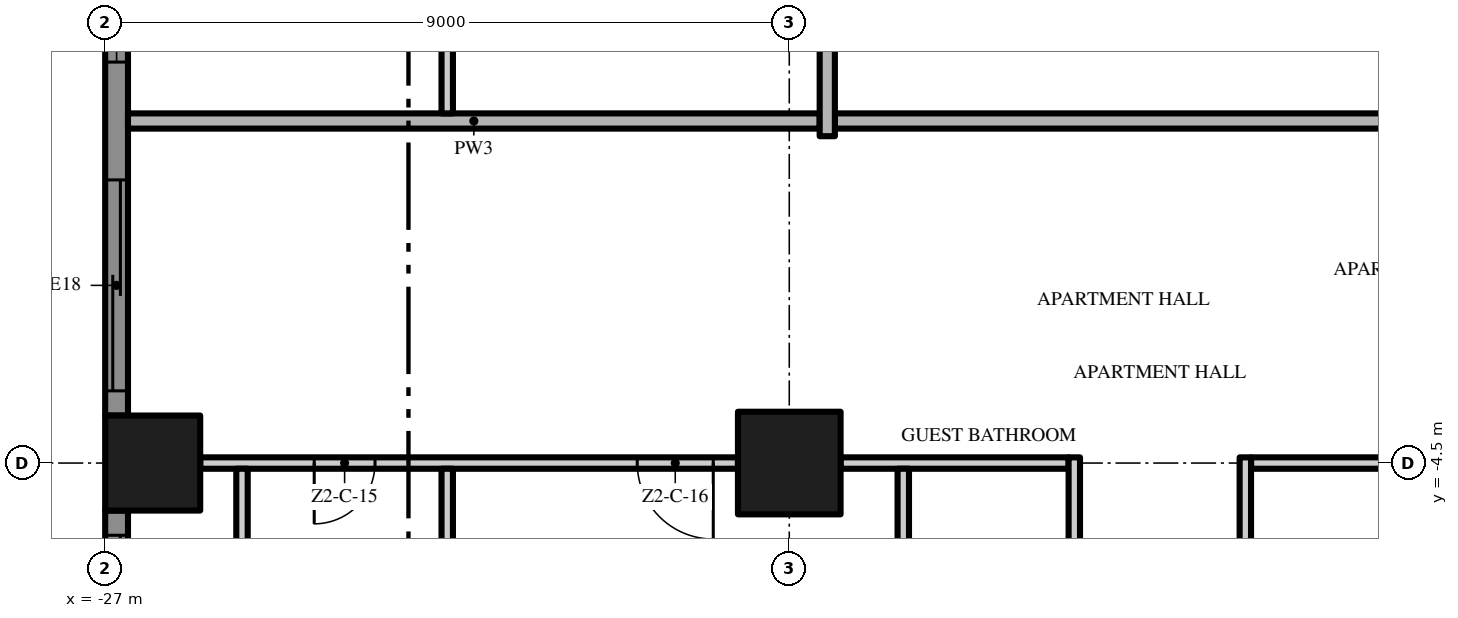
"""IFC4 building model, lengths in metres.
Left out: names, types, materials, properties, quantities, classifications, styles, units other than length and angle.
Written with IfcOpenShell. Run it as: python <this file> out.ifc"""

import sys

from ifc_helpers import new_model, si_unit, direction, frame, frame_2d, origin, origin_2d, place, context, subcontext, project, spatial, polyline, rectangle, outline, extrude, element, fill, save


model = new_model("IFC4")
c1 = context("Model", 3, precision=1e-05, world=origin(), true_north=direction((0.0, 1.0)))
c2 = subcontext(c1, "Body", "Model", "MODEL_VIEW")
j1 = project(units=[si_unit("LENGTHUNIT", "METRE"), si_unit("PLANEANGLEUNIT", "RADIAN")], contexts=[c1])
p1 = place(None, origin())
s1 = spatial("IfcSite", under=j1, at=p1, CompositionType="ELEMENT")
p2 = place(p1, origin())
s2 = spatial("IfcBuilding", under=s1, at=p2, CompositionType="ELEMENT")
p3 = place(p2, frame((0.0, 0.0, 99.8)))
s3 = spatial("IfcBuildingStorey", under=s2, at=p3, CompositionType="ELEMENT", Elevation=99.8)
p4 = place(p3, frame((-18.0, -4.5, 0.0), z_axis=(0.0, 0.0, 1.0), x_axis=(1.0, 0.0, 0.0)))
e1 = element("IfcColumn", 1, at=p4, inside=s3, PredefinedType="COLUMN", context=c2, shape_type="SweptSolid", body=[
    extrude(rectangle(XDim=1.35, YDim=1.35, at=origin_2d()), origin(), (0.0, 0.0, 1.0), 3.5),
])
p5 = place(p3, frame((-26.375, -4.5, 0.0), z_axis=(0.0, 0.0, 1.0), x_axis=(1.0, 0.0, 0.0)))
e2 = element("IfcColumn", 2, at=p5, inside=s3, PredefinedType="COLUMN", context=c2, shape_type="SweptSolid", body=[
    extrude(rectangle(XDim=1.25, YDim=1.25, at=origin_2d()), origin(), (0.0, 0.0, 1.0), 3.5),
])
p6 = place(p3, frame((-26.85, -3.875, 0.0), z_axis=(0.0, 0.0, 1.0), x_axis=(0.0, 1.0, 0.0)))
e3 = element("IfcWall", 3, at=p6, inside=s3, PredefinedType="SOLIDWALL", context=c2, shape_type="SweptSolid", body=[
    extrude(rectangle(XDim=7.75, YDim=0.3, at=frame_2d((3.875, 0.0))), origin(), (0.0, 0.0, 1.0), 3.5),
])
p7 = place(p6, frame((4.65, 0.0, 0.45)))
e4 = element("IfcOpeningElement", 4, at=p7, cuts=e3, PredefinedType="OPENING", context=c2, shape_type="SweptSolid", body=[
    extrude(rectangle(XDim=2.775, YDim=2.65, at=frame_2d((1.387, 1.325))), frame((0.0, 0.16, 0.0), z_axis=(0.0, -1.0, 0.0), x_axis=(1.0, 0.0, 0.0)), (0.0, 0.0, 1.0), 0.32),
])
p8 = place(p6, frame((0.325, 0.0, 0.0)))
e5 = element("IfcOpeningElement", 5, at=p8, cuts=e3, PredefinedType="OPENING", context=c2, shape_type="SweptSolid", body=[
    extrude(rectangle(XDim=2.775, YDim=2.4, at=frame_2d((1.387, 1.2))), frame((0.0, 0.16, 0.0), z_axis=(0.0, -1.0, 0.0), x_axis=(1.0, 0.0, 0.0)), (0.0, 0.0, 1.0), 0.32),
])
p9 = place(p3, frame((-26.85, -12.875, 0.0), z_axis=(0.0, 0.0, 1.0), x_axis=(0.0, 1.0, 0.0)))
e6 = element("IfcWall", 6, at=p9, inside=s3, PredefinedType="SOLIDWALL", context=c2, shape_type="SweptSolid", body=[
    extrude(rectangle(XDim=7.75, YDim=0.3, at=frame_2d((3.875, 0.0))), origin(), (0.0, 0.0, 1.0), 3.5),
])
p10 = place(p9, frame((4.65, 0.0, 0.0)))
e7 = element("IfcOpeningElement", 7, at=p10, cuts=e6, PredefinedType="OPENING", context=c2, shape_type="SweptSolid", body=[
    extrude(rectangle(XDim=2.775, YDim=2.4, at=frame_2d((1.387, 1.2))), frame((0.0, 0.16, 0.0), z_axis=(0.0, -1.0, 0.0), x_axis=(1.0, 0.0, 0.0)), (0.0, 0.0, 1.0), 0.32),
])
p11 = place(p9, frame((0.325, 0.0, 0.45)))
e8 = element("IfcOpeningElement", 8, at=p11, cuts=e6, PredefinedType="OPENING", context=c2, shape_type="SweptSolid", body=[
    extrude(rectangle(XDim=2.775, YDim=2.65, at=frame_2d((1.387, 1.325))), frame((0.0, 0.16, 0.0), z_axis=(0.0, -1.0, 0.0), x_axis=(1.0, 0.0, 0.0)), (0.0, 0.0, 1.0), 0.32),
])
p12 = place(p3, origin())
e9 = element("IfcWall", 9, at=p12, inside=s3, PredefinedType="USERDEFINED", context=c2, shape_type="SweptSolid", body=[
    extrude(outline(polyline([(-27.6, 18.0), (-27.829, 16.5), (-28.429, 15.0), (-29.171, 13.5), (-29.771, 12.0), (-30.0, 10.5), (-29.771, 9.0), (-29.171, 7.5), (-28.429, 6.0), (-27.829, 4.5), (-27.6, 3.0), (-27.829, 1.5), (-28.429, 0.0), (-29.171, -1.5), (-29.771, -3.0), (-30.0, -4.5), (-29.771, -6.0), (-29.171, -7.5), (-28.429, -9.0), (-27.829, -10.5), (-27.6, -12.0), (-27.829, -13.5), (-28.429, -15.0), (-29.171, -16.5), (-29.771, -18.0), (-29.539, -18.093), (-28.942, -16.602), (-28.201, -15.102), (-27.586, -13.566), (-27.347, -12.0), (-27.586, -10.434), (-28.201, -8.898), (-28.942, -7.398), (-29.528, -5.934), (-29.747, -4.5), (-29.528, -3.066), (-28.942, -1.602), (-28.201, -0.102), (-27.586, 1.434), (-27.347, 3.0), (-27.586, 4.566), (-28.201, 6.102), (-28.942, 7.602), (-29.528, 9.066), (-29.747, 10.5), (-29.528, 11.934), (-28.942, 13.398), (-28.201, 14.898), (-27.586, 16.434), (-27.353, 17.962), (-27.6, 18.0)])), origin(), (0.0, 0.0, 1.0), 0.9),
])
p13 = place(p3, frame((-18.675, -4.5, 0.0), z_axis=(0.0, 0.0, 1.0), x_axis=(-1.0, 0.0, 0.0)))
e10 = element("IfcWall", 10, at=p13, inside=s3, PredefinedType="PARTITIONING", context=c2, shape_type="SweptSolid", body=[
    extrude(rectangle(XDim=7.075, YDim=0.15, at=frame_2d((3.538, 0.0))), origin(), (0.0, 0.0, 1.0), 3.5),
])
p14 = place(p13, frame((4.775, 0.0, 0.0)))
e11 = element("IfcOpeningElement", 11, at=p14, cuts=e10, PredefinedType="OPENING", context=c2, shape_type="SweptSolid", body=[
    extrude(rectangle(XDim=0.8, YDim=2.0, at=frame_2d((0.4, 1.0))), frame((0.0, 0.085, 0.0), z_axis=(0.0, -1.0, 0.0), x_axis=(1.0, 0.0, 0.0)), (0.0, 0.0, 1.0), 0.17),
])
p15 = place(p13, frame((0.325, 0.0, 0.0)))
e12 = element("IfcOpeningElement", 12, at=p15, cuts=e10, PredefinedType="OPENING", context=c2, shape_type="SweptSolid", body=[
    extrude(rectangle(XDim=1.0, YDim=2.4, at=frame_2d((0.5, 1.2))), frame((0.0, 0.085, 0.0), z_axis=(0.0, -1.0, 0.0), x_axis=(1.0, 0.0, 0.0)), (0.0, 0.0, 1.0), 0.17),
])
p16 = place(p3, frame((-17.325, -4.5, 0.0), z_axis=(0.0, 0.0, 1.0), x_axis=(1.0, 0.0, 0.0)))
e13 = element("IfcWall", 13, at=p16, inside=s3, PredefinedType="PARTITIONING", context=c2, shape_type="SweptSolid", body=[
    extrude(rectangle(XDim=3.0, YDim=0.15, at=frame_2d((1.5, 0.0))), origin(), (0.0, 0.0, 1.0), 3.5),
])
p17 = place(p3, frame((-11.925, -4.5, 0.0), z_axis=(0.0, 0.0, 1.0), x_axis=(1.0, 0.0, 0.0)))
e14 = element("IfcWall", 14, at=p17, inside=s3, PredefinedType="PARTITIONING", context=c2, shape_type="SweptSolid", body=[
    extrude(rectangle(XDim=2.25, YDim=0.15, at=frame_2d((1.125, 0.0))), origin(), (0.0, 0.0, 1.0), 3.5),
])
p18 = place(p3, frame((-0.1, 0.0, 0.0), z_axis=(0.0, 0.0, 1.0), x_axis=(-1.0, 0.0, 0.0)))
e15 = element("IfcWall", 15, at=p18, inside=s3, PredefinedType="PARTITIONING", context=c2, shape_type="SweptSolid", body=[
    extrude(rectangle(XDim=17.3, YDim=0.2, at=frame_2d((8.65, 0.0))), origin(), (0.0, 0.0, 1.0), 3.5),
])
p19 = place(p18, frame((8.15, 0.0, 0.0)))
e16 = element("IfcOpeningElement", 16, at=p19, cuts=e15, PredefinedType="OPENING", context=c2, shape_type="SweptSolid", body=[
    extrude(rectangle(XDim=1.5, YDim=2.4, at=frame_2d((0.75, 1.2))), frame((0.0, 0.11, 0.0), z_axis=(0.0, -1.0, 0.0), x_axis=(1.0, 0.0, 0.0)), (0.0, 0.0, 1.0), 0.22),
])
p20 = place(p3, frame((-26.7, 0.0, 0.0), z_axis=(0.0, 0.0, 1.0), x_axis=(1.0, 0.0, 0.0)))
e17 = element("IfcWall", 17, at=p20, inside=s3, PredefinedType="PARTITIONING", context=c2, shape_type="SweptSolid", body=[
    extrude(rectangle(XDim=9.1, YDim=0.2, at=frame_2d((4.55, 0.0))), origin(), (0.0, 0.0, 1.0), 3.5),
])
for number, where, z_axis, x_axis in (
    (18, (-25.2, -8.925, 0.0), (0.0, 0.0, 1.0), (0.0, 1.0, 0.0)),
    (19, (-22.5, -8.925, 0.0), (0.0, 0.0, 1.0), (0.0, 1.0, 0.0)),
):
    element("IfcWall", number, at=place(p3, frame(where, z_axis=z_axis, x_axis=x_axis)), inside=s3, PredefinedType="PARTITIONING", context=c2, shape_type="SweptSolid", body=[
        extrude(rectangle(XDim=4.35, YDim=0.15, at=frame_2d((2.175, 0.0))), origin(), (0.0, 0.0, 1.0), 3.5),
    ])
p21 = place(p3, frame((-22.5, 0.1, 0.0), z_axis=(0.0, 0.0, 1.0), x_axis=(0.0, 1.0, 0.0)))
e20 = element("IfcWall", 20, at=p21, inside=s3, PredefinedType="PARTITIONING", context=c2, shape_type="SweptSolid", body=[
    extrude(rectangle(XDim=17.275, YDim=0.15, at=frame_2d((8.637, 0.0))), origin(), (0.0, 0.0, 1.0), 3.5),
])
p22 = place(p21, frame((1.65, 0.0, 0.0)))
e21 = element("IfcOpeningElement", 21, at=p22, cuts=e20, PredefinedType="OPENING", context=c2, shape_type="SweptSolid", body=[
    extrude(rectangle(XDim=1.0, YDim=2.4, at=frame_2d((0.5, 1.2))), frame((0.0, 0.085, 0.0), z_axis=(0.0, -1.0, 0.0), x_axis=(1.0, 0.0, 0.0)), (0.0, 0.0, 1.0), 0.17),
])
p23 = place(p21, frame((7.25, 0.0, 0.0)))
e22 = element("IfcOpeningElement", 22, at=p23, cuts=e20, PredefinedType="OPENING", context=c2, shape_type="SweptSolid", body=[
    extrude(rectangle(XDim=1.0, YDim=2.4, at=frame_2d((0.5, 1.2))), frame((0.0, 0.085, 0.0), z_axis=(0.0, -1.0, 0.0), x_axis=(1.0, 0.0, 0.0)), (0.0, 0.0, 1.0), 0.17),
])
p24 = place(p21, frame((11.4, 0.0, 0.0)))
e23 = element("IfcOpeningElement", 23, at=p24, cuts=e20, PredefinedType="OPENING", context=c2, shape_type="SweptSolid", body=[
    extrude(rectangle(XDim=1.8, YDim=2.4, at=frame_2d((0.9, 1.2))), frame((0.0, 0.085, 0.0), z_axis=(0.0, -1.0, 0.0), x_axis=(1.0, 0.0, 0.0)), (0.0, 0.0, 1.0), 0.17),
])
p25 = place(p3, frame((-17.5, -0.2, 0.0), z_axis=(0.0, 0.0, 1.0), x_axis=(0.0, 1.0, 0.0)))
e24 = element("IfcWall", 24, at=p25, inside=s3, PredefinedType="PARTITIONING", context=c2, shape_type="SweptSolid", body=[
    extrude(rectangle(XDim=4.025, YDim=0.2, at=frame_2d((2.013, 0.0))), origin(), (0.0, 0.0, 1.0), 3.5),
])
p26 = place(p3, frame((-16.5, -8.925, 0.0), z_axis=(0.0, 0.0, 1.0), x_axis=(0.0, 1.0, 0.0)))
e25 = element("IfcWall", 25, at=p26, inside=s3, PredefinedType="PARTITIONING", context=c2, shape_type="SweptSolid", body=[
    extrude(rectangle(XDim=4.35, YDim=0.15, at=frame_2d((2.175, 0.0))), origin(), (0.0, 0.0, 1.0), 3.5),
])
p27 = place(p3, frame((-14.25, -8.925, 0.0), z_axis=(0.0, 0.0, 1.0), x_axis=(0.0, 1.0, 0.0)))
e26 = element("IfcWall", 26, at=p27, inside=s3, PredefinedType="PARTITIONING", context=c2, shape_type="SweptSolid", body=[
    extrude(rectangle(XDim=4.5, YDim=0.15, at=frame_2d((2.25, 0.0))), origin(), (0.0, 0.0, 1.0), 3.5),
])
p28 = place(p27, frame((1.75, 0.0, 0.0)))
e27 = element("IfcOpeningElement", 27, at=p28, cuts=e26, PredefinedType="OPENING", context=c2, shape_type="SweptSolid", body=[
    extrude(rectangle(XDim=0.9, YDim=2.1, at=frame_2d((0.45, 1.05))), frame((0.0, 0.085, 0.0), z_axis=(0.0, -1.0, 0.0), x_axis=(1.0, 0.0, 0.0)), (0.0, 0.0, 1.0), 0.17),
])
p29 = place(p3, frame((-12.0, -9.075, 0.0), z_axis=(0.0, 0.0, 1.0), x_axis=(0.0, 1.0, 0.0)))
e28 = element("IfcWall", 28, at=p29, inside=s3, PredefinedType="PARTITIONING", context=c2, shape_type="SweptSolid", body=[
    extrude(rectangle(XDim=4.65, YDim=0.15, at=frame_2d((2.325, 0.0))), origin(), (0.0, 0.0, 1.0), 3.5),
])
p30 = place(p7, origin())
e29 = element("IfcWindow", 29, at=p30, inside=s3, PartitioningType="SINGLE_PANEL", PredefinedType="WINDOW", context=c2, shape_type="SweptSolid", body=[
    extrude(rectangle(XDim=2.775, YDim=2.65, at=frame_2d((1.387, 1.325))), frame((0.0, 0.03, 0.0), z_axis=(0.0, -1.0, 0.0), x_axis=(1.0, 0.0, 0.0)), (0.0, 0.0, 1.0), 0.06),
])
fill(e4, e29)
p31 = place(p8, origin())
e30 = element("IfcDoor", 30, at=p31, inside=s3, OperationType="SINGLE_SWING_LEFT", PredefinedType="DOOR", context=c2, shape_type="SweptSolid", body=[
    extrude(rectangle(XDim=2.775, YDim=2.4, at=frame_2d((1.387, 1.2))), frame((0.0, 0.025, 0.0), z_axis=(0.0, -1.0, 0.0), x_axis=(1.0, 0.0, 0.0)), (0.0, 0.0, 1.0), 0.05),
])
fill(e5, e30)
p32 = place(p10, origin())
e31 = element("IfcDoor", 31, at=p32, inside=s3, OperationType="SINGLE_SWING_LEFT", PredefinedType="DOOR", context=c2, shape_type="SweptSolid", body=[
    extrude(rectangle(XDim=2.775, YDim=2.4, at=frame_2d((1.387, 1.2))), frame((0.0, 0.025, 0.0), z_axis=(0.0, -1.0, 0.0), x_axis=(1.0, 0.0, 0.0)), (0.0, 0.0, 1.0), 0.05),
])
fill(e7, e31)
p33 = place(p14, origin())
e32 = element("IfcDoor", 32, at=p33, inside=s3, OperationType="SINGLE_SWING_RIGHT", PredefinedType="DOOR", context=c2, shape_type="SweptSolid", body=[
    extrude(rectangle(XDim=0.8, YDim=2.0, at=frame_2d((0.4, 1.0))), frame((0.0, 0.025, 0.0), z_axis=(0.0, -1.0, 0.0), x_axis=(1.0, 0.0, 0.0)), (0.0, 0.0, 1.0), 0.05),
])
fill(e11, e32)
p34 = place(p15, origin())
e33 = element("IfcDoor", 33, at=p34, inside=s3, OperationType="SINGLE_SWING_LEFT", PredefinedType="DOOR", context=c2, shape_type="SweptSolid", body=[
    extrude(rectangle(XDim=1.0, YDim=2.4, at=frame_2d((0.5, 1.2))), frame((0.0, 0.025, 0.0), z_axis=(0.0, -1.0, 0.0), x_axis=(1.0, 0.0, 0.0)), (0.0, 0.0, 1.0), 0.05),
])
fill(e12, e33)
save(model, sys.argv[1])
